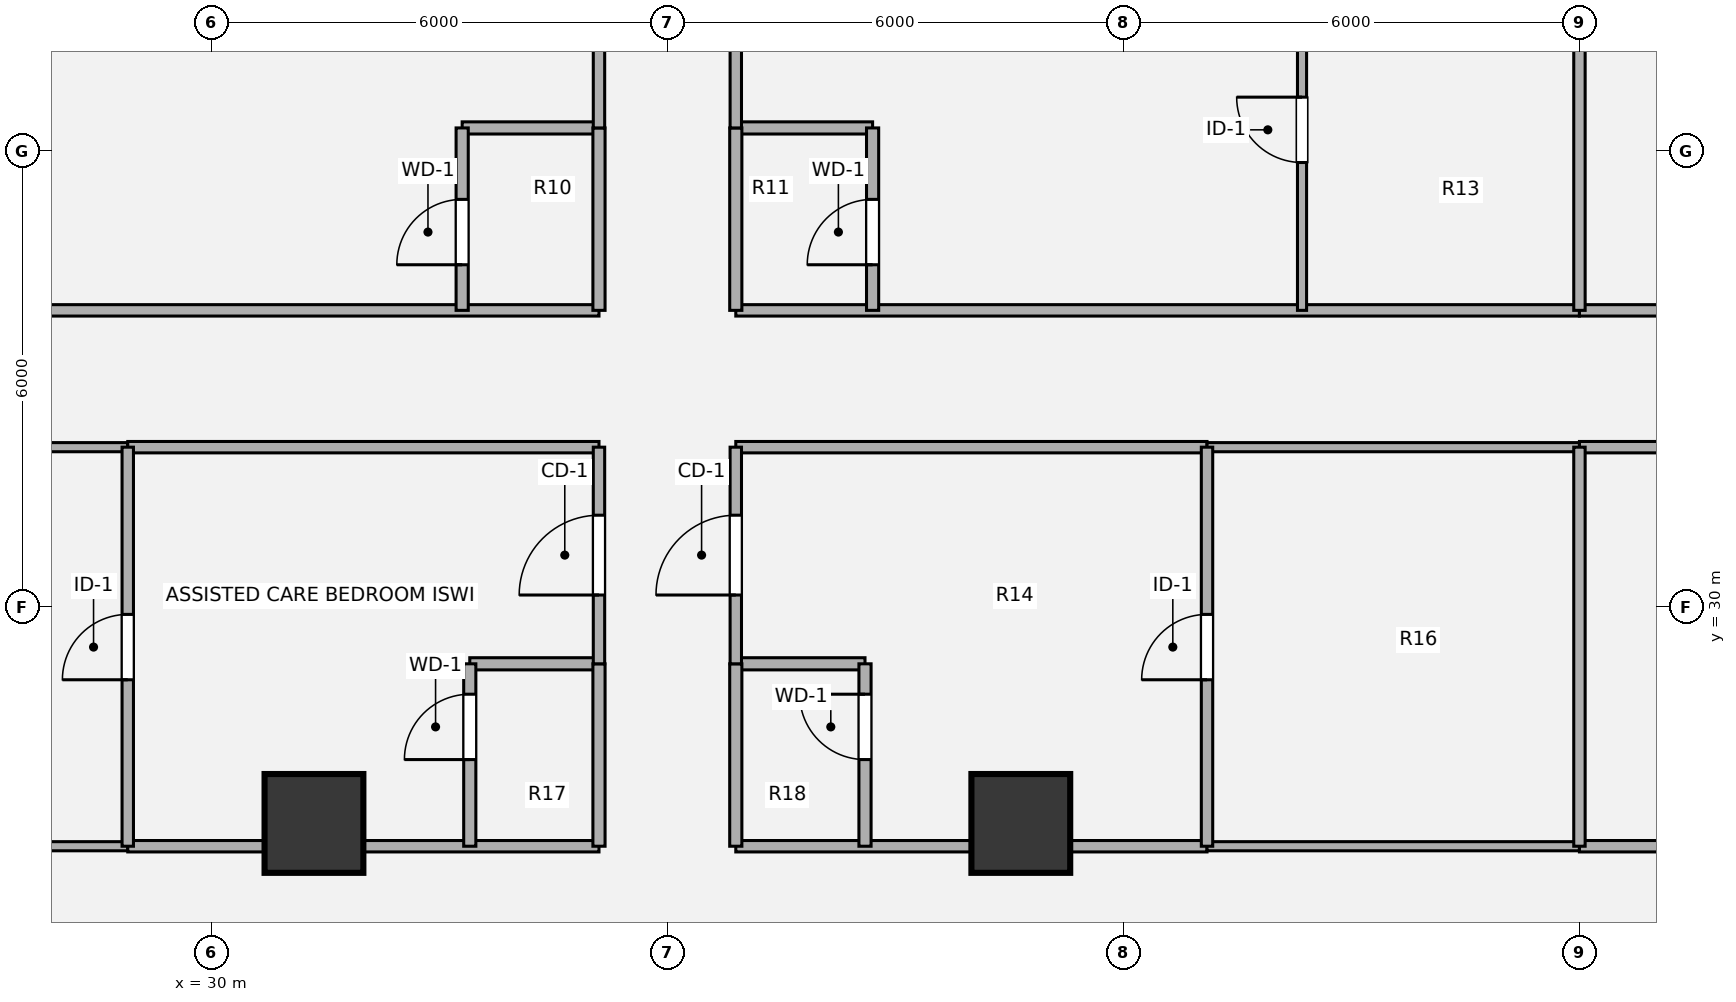
"""IFC4 building model, lengths in metres.
Left out: names, types, materials, properties, quantities, classifications, styles, units other than length and angle.
Written with IfcOpenShell. Run it as: python <this file> out.ifc"""

import sys

from ifc_helpers import new_model, si_unit, direction, frame, frame_2d, origin, origin_2d, place, context, subcontext, project, spatial, rectangle, hollow_circle, extrude, source, transform, mapped, element, fill, save


model = new_model("IFC4")
c1 = context("Model", 3, precision=1e-05, world=origin(), true_north=direction((0.0, 1.0)))
c2 = subcontext(c1, "Body", "Model", "MODEL_VIEW")
j1 = project(units=[si_unit("LENGTHUNIT", "METRE"), si_unit("PLANEANGLEUNIT", "RADIAN")], contexts=[c1])
p1 = place(None, origin())
s1 = spatial("IfcSite", under=j1, at=p1, CompositionType="ELEMENT")
p2 = place(p1, origin())
s2 = spatial("IfcBuilding", under=s1, at=p2, CompositionType="ELEMENT")
p3 = place(p2, frame((0.0, 0.0, 89.82)))
s3 = spatial("IfcBuildingStorey", under=s2, at=p3, CompositionType="ELEMENT", Elevation=89.82)
m1 = source(origin(), c2, "Body", "SweptSolid", [
    extrude(hollow_circle(Radius=0.65, WallThickness=0.045, at=origin_2d()), origin(), (0.0, 0.0, 1.0), 3.78),
])
for number, where, z_axis, x_axis in (
    (1, (31.35, 27.15, 0.0), (0.0, 0.0, 1.0), (1.0, 0.0, 0.0)),
    (2, (40.65, 27.15, 0.0), (0.0, 0.0, 1.0), (1.0, 0.0, 0.0)),
):
    element("IfcColumn", number, at=place(p3, frame(where, z_axis=z_axis, x_axis=x_axis)), inside=s3, PredefinedType="COLUMN", context=c2, shape_type="MappedRepresentation", body=[
        mapped(m1, transform((0.0, 0.0, 0.0), x_axis=(1.0, 0.0, 0.0), y_axis=(0.0, 1.0, 0.0), z_axis=(0.0, 0.0, 1.0), scale=1.0)),
    ])
p4 = place(p3, frame((24.0, 26.85, 0.0), z_axis=(0.0, 0.0, 1.0), x_axis=(1.0, 0.0, 0.0)))
e3 = element("IfcWall", 3, at=p4, inside=s3, PredefinedType="PARTITIONING", context=c2, shape_type="SweptSolid", body=[
    extrude(rectangle(XDim=4.9, YDim=0.12, at=frame_2d((2.45, 0.0))), origin(), (0.0, 0.0, 1.0), 3.055),
])
for number, where, z_axis, x_axis in (
    (4, (28.9, 26.85, 0.0), (0.0, 0.0, 1.0), (1.0, 0.0, 0.0)),
    (5, (36.9, 26.85, 0.0), (0.0, 0.0, 1.0), (1.0, 0.0, 0.0)),
):
    element("IfcWall", number, at=place(p3, frame(where, z_axis=z_axis, x_axis=x_axis)), inside=s3, PredefinedType="PARTITIONING", context=c2, shape_type="SweptSolid", body=[
        extrude(rectangle(XDim=6.2, YDim=0.15, at=frame_2d((3.1, 0.0))), origin(), (0.0, 0.0, 1.0), 2.903),
    ])
p5 = place(p3, frame((43.1, 26.85, 0.0), z_axis=(0.0, 0.0, 1.0), x_axis=(1.0, 0.0, 0.0)))
e6 = element("IfcWall", 6, at=p5, inside=s3, PredefinedType="PARTITIONING", context=c2, shape_type="SweptSolid", body=[
    extrude(rectangle(XDim=4.9, YDim=0.12, at=frame_2d((2.45, 0.0))), origin(), (0.0, 0.0, 1.0), 3.055),
])
p6 = place(p3, frame((48.0, 26.85, 0.0), z_axis=(0.0, 0.0, 1.0), x_axis=(1.0, 0.0, 0.0)))
e7 = element("IfcWall", 7, at=p6, inside=s3, PredefinedType="PARTITIONING", context=c2, shape_type="SweptSolid", body=[
    extrude(rectangle(XDim=9.949, YDim=0.15, at=frame_2d((4.974, 0.0))), origin(), (0.0, 0.0, 1.0), 3.055),
])
for number, where, z_axis, x_axis in (
    (8, (33.4, 29.25, 0.0), (0.0, 0.0, 1.0), (1.0, 0.0, 0.0)),
    (9, (36.9, 29.25, 0.0), (0.0, 0.0, 1.0), (1.0, 0.0, 0.0)),
):
    element("IfcWall", number, at=place(p3, frame(where, z_axis=z_axis, x_axis=x_axis)), inside=s3, PredefinedType="PLUMBINGWALL", context=c2, shape_type="SweptSolid", body=[
        extrude(rectangle(XDim=1.7, YDim=0.16, at=frame_2d((0.85, 0.0))), origin(), (0.0, 0.0, 1.0), 3.259),
    ])
p7 = place(p3, frame((24.0, 32.1, 0.0), z_axis=(0.0, 0.0, 1.0), x_axis=(1.0, 0.0, 0.0)))
e10 = element("IfcWall", 10, at=p7, inside=s3, PredefinedType="PARTITIONING", context=c2, shape_type="SweptSolid", body=[
    extrude(rectangle(XDim=4.9, YDim=0.12, at=frame_2d((2.45, 0.0))), origin(), (0.0, 0.0, 1.0), 2.982),
])
for number, where, z_axis, x_axis in (
    (11, (28.9, 32.1, 0.0), (0.0, 0.0, 1.0), (1.0, 0.0, 0.0)),
    (12, (36.9, 32.1, 0.0), (0.0, 0.0, 1.0), (1.0, 0.0, 0.0)),
):
    element("IfcWall", number, at=place(p3, frame(where, z_axis=z_axis, x_axis=x_axis)), inside=s3, PredefinedType="PARTITIONING", context=c2, shape_type="SweptSolid", body=[
        extrude(rectangle(XDim=6.2, YDim=0.15, at=frame_2d((3.1, 0.0))), origin(), (0.0, 0.0, 1.0), 2.982),
    ])
p8 = place(p3, frame((43.1, 32.1, 0.0), z_axis=(0.0, 0.0, 1.0), x_axis=(1.0, 0.0, 0.0)))
e13 = element("IfcWall", 13, at=p8, inside=s3, PredefinedType="PARTITIONING", context=c2, shape_type="SweptSolid", body=[
    extrude(rectangle(XDim=4.9, YDim=0.12, at=frame_2d((2.45, 0.0))), origin(), (0.0, 0.0, 1.0), 2.982),
])
p9 = place(p3, frame((48.0, 32.1, 0.0), z_axis=(0.0, 0.0, 1.0), x_axis=(1.0, 0.0, 0.0)))
e14 = element("IfcWall", 14, at=p9, inside=s3, PredefinedType="PARTITIONING", context=c2, shape_type="SweptSolid", body=[
    extrude(rectangle(XDim=10.02, YDim=0.15, at=frame_2d((5.01, 0.0))), origin(), (0.0, 0.0, 1.0), 2.982),
])
p10 = place(p9, frame((2.275, 0.0, 0.0)))
e15 = element("IfcOpeningElement", 15, at=p10, cuts=e14, PredefinedType="OPENING", context=c2, shape_type="SweptSolid", body=[
    extrude(rectangle(XDim=1.05, YDim=2.1, at=origin_2d()), frame((0.525, 0.085, 1.05), z_axis=(0.0, -1.0, 0.0), x_axis=(1.0, 0.0, 0.0)), (0.0, 0.0, 1.0), 0.17),
])
for number, where, z_axis, x_axis in (
    (16, (24.0, 33.9, 0.0), (0.0, 0.0, 1.0), (1.0, 0.0, 0.0)),
    (17, (36.9, 33.9, 0.0), (0.0, 0.0, 1.0), (1.0, 0.0, 0.0)),
):
    element("IfcWall", number, at=place(p3, frame(where, z_axis=z_axis, x_axis=x_axis)), inside=s3, PredefinedType="PARTITIONING", context=c2, shape_type="SweptSolid", body=[
        extrude(rectangle(XDim=11.1, YDim=0.15, at=frame_2d((5.55, 0.0))), origin(), (0.0, 0.0, 1.0), 2.982),
    ])
p11 = place(p3, frame((48.0, 33.9, 0.0), z_axis=(0.0, 0.0, 1.0), x_axis=(1.0, 0.0, 0.0)))
e18 = element("IfcWall", 18, at=p11, inside=s3, PredefinedType="PARTITIONING", context=c2, shape_type="SweptSolid", body=[
    extrude(rectangle(XDim=10.02, YDim=0.15, at=frame_2d((5.01, 0.0))), origin(), (0.0, 0.0, 1.0), 2.982),
])
p12 = place(p11, frame((2.275, 0.0, 0.0)))
e19 = element("IfcOpeningElement", 19, at=p12, cuts=e18, PredefinedType="OPENING", context=c2, shape_type="SweptSolid", body=[
    extrude(rectangle(XDim=1.05, YDim=2.1, at=origin_2d()), frame((0.525, 0.085, 1.05), z_axis=(0.0, -1.0, 0.0), x_axis=(1.0, 0.0, 0.0)), (0.0, 0.0, 1.0), 0.17),
])
for number, where, z_axis, x_axis in (
    (20, (33.3, 36.3, 0.0), (0.0, 0.0, 1.0), (1.0, 0.0, 0.0)),
    (21, (36.9, 36.3, 0.0), (0.0, 0.0, 1.0), (1.0, 0.0, 0.0)),
):
    element("IfcWall", number, at=place(p3, frame(where, z_axis=z_axis, x_axis=x_axis)), inside=s3, PredefinedType="PLUMBINGWALL", context=c2, shape_type="SweptSolid", body=[
        extrude(rectangle(XDim=1.8, YDim=0.16, at=frame_2d((0.9, 0.0))), origin(), (0.0, 0.0, 1.0), 3.259),
    ])
p13 = place(p3, frame((28.9, 26.85, 0.0), z_axis=(0.0, 0.0, 1.0), x_axis=(0.0, 1.0, 0.0)))
e22 = element("IfcWall", 22, at=p13, inside=s3, PredefinedType="PARTITIONING", context=c2, shape_type="SweptSolid", body=[
    extrude(rectangle(XDim=5.25, YDim=0.15, at=frame_2d((2.625, 0.0))), origin(), (0.0, 0.0, 1.0), 3.5),
])
p14 = place(p13, frame((2.19, 0.0, 0.0)))
e23 = element("IfcOpeningElement", 23, at=p14, cuts=e22, PredefinedType="OPENING", context=c2, shape_type="SweptSolid", body=[
    extrude(rectangle(XDim=0.86, YDim=2.1, at=origin_2d()), frame((0.43, 0.085, 1.05), z_axis=(0.0, -1.0, 0.0), x_axis=(1.0, 0.0, 0.0)), (0.0, 0.0, 1.0), 0.17),
])
p15 = place(p3, frame((33.3, 33.9, 0.0), z_axis=(0.0, 0.0, 1.0), x_axis=(0.0, 1.0, 0.0)))
e24 = element("IfcWall", 24, at=p15, inside=s3, PredefinedType="PLUMBINGWALL", context=c2, shape_type="SweptSolid", body=[
    extrude(rectangle(XDim=2.4, YDim=0.16, at=frame_2d((1.2, 0.0))), origin(), (0.0, 0.0, 1.0), 3.5),
])
p16 = place(p15, frame((0.6, 0.0, 0.0)))
e25 = element("IfcOpeningElement", 25, at=p16, cuts=e24, PredefinedType="OPENING", context=c2, shape_type="SweptSolid", body=[
    extrude(rectangle(XDim=0.86, YDim=2.1, at=origin_2d()), frame((0.43, 0.09, 1.05), z_axis=(0.0, -1.0, 0.0), x_axis=(1.0, 0.0, 0.0)), (0.0, 0.0, 1.0), 0.18),
])
p17 = place(p3, frame((33.4, 26.85, 0.0), z_axis=(0.0, 0.0, 1.0), x_axis=(0.0, 1.0, 0.0)))
e26 = element("IfcWall", 26, at=p17, inside=s3, PredefinedType="PLUMBINGWALL", context=c2, shape_type="SweptSolid", body=[
    extrude(rectangle(XDim=2.4, YDim=0.16, at=frame_2d((1.2, 0.0))), origin(), (0.0, 0.0, 1.0), 3.5),
])
p18 = place(p17, frame((1.14, 0.0, 0.0)))
e27 = element("IfcOpeningElement", 27, at=p18, cuts=e26, PredefinedType="OPENING", context=c2, shape_type="SweptSolid", body=[
    extrude(rectangle(XDim=0.86, YDim=2.1, at=origin_2d()), frame((0.43, 0.09, 1.05), z_axis=(0.0, -1.0, 0.0), x_axis=(1.0, 0.0, 0.0)), (0.0, 0.0, 1.0), 0.18),
])
p19 = place(p3, frame((35.1, 26.85, 0.0), z_axis=(0.0, 0.0, 1.0), x_axis=(0.0, 1.0, 0.0)))
e28 = element("IfcWall", 28, at=p19, inside=s3, PredefinedType="PLUMBINGWALL", context=c2, shape_type="SweptSolid", body=[
    extrude(rectangle(XDim=2.4, YDim=0.16, at=frame_2d((1.2, 0.0))), origin(), (0.0, 0.0, 1.0), 3.5),
])
p20 = place(p3, frame((35.1, 29.25, 0.0), z_axis=(0.0, 0.0, 1.0), x_axis=(0.0, 1.0, 0.0)))
e29 = element("IfcWall", 29, at=p20, inside=s3, PredefinedType="PARTITIONING", context=c2, shape_type="SweptSolid", body=[
    extrude(rectangle(XDim=2.85, YDim=0.15, at=frame_2d((1.425, 0.0))), origin(), (0.0, 0.0, 1.0), 3.5),
])
p21 = place(p20, frame((0.905, 0.0, 0.0)))
e30 = element("IfcOpeningElement", 30, at=p21, cuts=e29, PredefinedType="OPENING", context=c2, shape_type="SweptSolid", body=[
    extrude(rectangle(XDim=1.05, YDim=2.1, at=origin_2d()), frame((0.525, 0.085, 1.05), z_axis=(0.0, -1.0, 0.0), x_axis=(1.0, 0.0, 0.0)), (0.0, 0.0, 1.0), 0.17),
])
p22 = place(p3, frame((35.1, 33.9, 0.0), z_axis=(0.0, 0.0, 1.0), x_axis=(0.0, 1.0, 0.0)))
e31 = element("IfcWall", 31, at=p22, inside=s3, PredefinedType="PLUMBINGWALL", context=c2, shape_type="SweptSolid", body=[
    extrude(rectangle(XDim=2.4, YDim=0.16, at=frame_2d((1.2, 0.0))), origin(), (0.0, 0.0, 1.0), 3.5),
])
p23 = place(p3, frame((35.1, 36.3, 0.0), z_axis=(0.0, 0.0, 1.0), x_axis=(0.0, 1.0, 0.0)))
e32 = element("IfcWall", 32, at=p23, inside=s3, PredefinedType="PARTITIONING", context=c2, shape_type="SweptSolid", body=[
    extrude(rectangle(XDim=4.7, YDim=0.15, at=frame_2d((2.35, 0.0))), origin(), (0.0, 0.0, 1.0), 3.5),
])
p24 = place(p23, frame((1.89, 0.0, 0.0)))
e33 = element("IfcOpeningElement", 33, at=p24, cuts=e32, PredefinedType="OPENING", context=c2, shape_type="SweptSolid", body=[
    extrude(rectangle(XDim=0.92, YDim=2.1, at=origin_2d()), frame((0.46, 0.085, 1.05), z_axis=(0.0, -1.0, 0.0), x_axis=(1.0, 0.0, 0.0)), (0.0, 0.0, 1.0), 0.17),
])
p25 = place(p3, frame((36.9, 26.85, 0.0), z_axis=(0.0, 0.0, 1.0), x_axis=(0.0, 1.0, 0.0)))
e34 = element("IfcWall", 34, at=p25, inside=s3, PredefinedType="PLUMBINGWALL", context=c2, shape_type="SweptSolid", body=[
    extrude(rectangle(XDim=2.4, YDim=0.16, at=frame_2d((1.2, 0.0))), origin(), (0.0, 0.0, 1.0), 3.5),
])
p26 = place(p3, frame((36.9, 29.25, 0.0), z_axis=(0.0, 0.0, 1.0), x_axis=(0.0, 1.0, 0.0)))
e35 = element("IfcWall", 35, at=p26, inside=s3, PredefinedType="PARTITIONING", context=c2, shape_type="SweptSolid", body=[
    extrude(rectangle(XDim=2.85, YDim=0.15, at=frame_2d((1.425, 0.0))), origin(), (0.0, 0.0, 1.0), 3.5),
])
p27 = place(p26, frame((0.905, 0.0, 0.0)))
e36 = element("IfcOpeningElement", 36, at=p27, cuts=e35, PredefinedType="OPENING", context=c2, shape_type="SweptSolid", body=[
    extrude(rectangle(XDim=1.05, YDim=2.1, at=origin_2d()), frame((0.525, 0.085, 1.05), z_axis=(0.0, -1.0, 0.0), x_axis=(1.0, 0.0, 0.0)), (0.0, 0.0, 1.0), 0.17),
])
p28 = place(p3, frame((36.9, 33.9, 0.0), z_axis=(0.0, 0.0, 1.0), x_axis=(0.0, 1.0, 0.0)))
e37 = element("IfcWall", 37, at=p28, inside=s3, PredefinedType="PLUMBINGWALL", context=c2, shape_type="SweptSolid", body=[
    extrude(rectangle(XDim=2.4, YDim=0.16, at=frame_2d((1.2, 0.0))), origin(), (0.0, 0.0, 1.0), 3.5),
])
p29 = place(p3, frame((36.9, 36.3, 0.0), z_axis=(0.0, 0.0, 1.0), x_axis=(0.0, 1.0, 0.0)))
e38 = element("IfcWall", 38, at=p29, inside=s3, PredefinedType="PARTITIONING", context=c2, shape_type="SweptSolid", body=[
    extrude(rectangle(XDim=4.7, YDim=0.15, at=frame_2d((2.35, 0.0))), origin(), (0.0, 0.0, 1.0), 3.5),
])
p30 = place(p29, frame((1.89, 0.0, 0.0)))
e39 = element("IfcOpeningElement", 39, at=p30, cuts=e38, PredefinedType="OPENING", context=c2, shape_type="SweptSolid", body=[
    extrude(rectangle(XDim=0.92, YDim=2.1, at=origin_2d()), frame((0.46, 0.085, 1.05), z_axis=(0.0, -1.0, 0.0), x_axis=(1.0, 0.0, 0.0)), (0.0, 0.0, 1.0), 0.17),
])
p31 = place(p3, frame((38.6, 26.85, 0.0), z_axis=(0.0, 0.0, 1.0), x_axis=(0.0, 1.0, 0.0)))
e40 = element("IfcWall", 40, at=p31, inside=s3, PredefinedType="PLUMBINGWALL", context=c2, shape_type="SweptSolid", body=[
    extrude(rectangle(XDim=2.4, YDim=0.16, at=frame_2d((1.2, 0.0))), origin(), (0.0, 0.0, 1.0), 3.5),
])
p32 = place(p31, frame((1.14, 0.0, 0.0)))
e41 = element("IfcOpeningElement", 41, at=p32, cuts=e40, PredefinedType="OPENING", context=c2, shape_type="SweptSolid", body=[
    extrude(rectangle(XDim=0.86, YDim=2.1, at=origin_2d()), frame((0.43, 0.09, 1.05), z_axis=(0.0, -1.0, 0.0), x_axis=(1.0, 0.0, 0.0)), (0.0, 0.0, 1.0), 0.18),
])
p33 = place(p3, frame((38.7, 33.9, 0.0), z_axis=(0.0, 0.0, 1.0), x_axis=(0.0, 1.0, 0.0)))
e42 = element("IfcWall", 42, at=p33, inside=s3, PredefinedType="PLUMBINGWALL", context=c2, shape_type="SweptSolid", body=[
    extrude(rectangle(XDim=2.4, YDim=0.16, at=frame_2d((1.2, 0.0))), origin(), (0.0, 0.0, 1.0), 3.5),
])
p34 = place(p33, frame((0.6, 0.0, 0.0)))
e43 = element("IfcOpeningElement", 43, at=p34, cuts=e42, PredefinedType="OPENING", context=c2, shape_type="SweptSolid", body=[
    extrude(rectangle(XDim=0.86, YDim=2.1, at=origin_2d()), frame((0.43, 0.09, 1.05), z_axis=(0.0, -1.0, 0.0), x_axis=(1.0, 0.0, 0.0)), (0.0, 0.0, 1.0), 0.18),
])
p35 = place(p3, frame((43.1, 26.85, 0.0), z_axis=(0.0, 0.0, 1.0), x_axis=(0.0, 1.0, 0.0)))
e44 = element("IfcWall", 44, at=p35, inside=s3, PredefinedType="PARTITIONING", context=c2, shape_type="SweptSolid", body=[
    extrude(rectangle(XDim=5.25, YDim=0.15, at=frame_2d((2.625, 0.0))), origin(), (0.0, 0.0, 1.0), 3.5),
])
p36 = place(p35, frame((2.19, 0.0, 0.0)))
e45 = element("IfcOpeningElement", 45, at=p36, cuts=e44, PredefinedType="OPENING", context=c2, shape_type="SweptSolid", body=[
    extrude(rectangle(XDim=0.86, YDim=2.1, at=origin_2d()), frame((0.43, 0.085, 1.05), z_axis=(0.0, -1.0, 0.0), x_axis=(1.0, 0.0, 0.0)), (0.0, 0.0, 1.0), 0.17),
])
p37 = place(p3, frame((44.35, 33.9, 0.0), z_axis=(0.0, 0.0, 1.0), x_axis=(0.0, 1.0, 0.0)))
e46 = element("IfcWall", 46, at=p37, inside=s3, PredefinedType="PARTITIONING", context=c2, shape_type="SweptSolid", body=[
    extrude(rectangle(XDim=4.75, YDim=0.12, at=frame_2d((2.375, 0.0))), origin(), (0.0, 0.0, 1.0), 3.5),
])
p38 = place(p37, frame((1.945, 0.0, 0.0)))
e47 = element("IfcOpeningElement", 47, at=p38, cuts=e46, PredefinedType="OPENING", context=c2, shape_type="SweptSolid", body=[
    extrude(rectangle(XDim=0.86, YDim=2.1, at=origin_2d()), frame((0.43, 0.07, 1.05), z_axis=(0.0, -1.0, 0.0), x_axis=(1.0, 0.0, 0.0)), (0.0, 0.0, 1.0), 0.14),
])
p39 = place(p3, frame((48.0, 26.85, 0.0), z_axis=(0.0, 0.0, 1.0), x_axis=(0.0, 1.0, 0.0)))
e48 = element("IfcWall", 48, at=p39, inside=s3, PredefinedType="PARTITIONING", context=c2, shape_type="SweptSolid", body=[
    extrude(rectangle(XDim=5.25, YDim=0.15, at=frame_2d((2.625, 0.0))), origin(), (0.0, 0.0, 1.0), 3.5),
])
p40 = place(p3, frame((48.0, 33.9, 0.0), z_axis=(0.0, 0.0, 1.0), x_axis=(0.0, 1.0, 0.0)))
e49 = element("IfcWall", 49, at=p40, inside=s3, PredefinedType="PARTITIONING", context=c2, shape_type="SweptSolid", body=[
    extrude(rectangle(XDim=13.421, YDim=0.15, at=frame_2d((6.71, 0.0))), origin(), (0.0, 0.0, 1.0), 3.5),
])
m2 = source(origin(), c2, "Body", "SweptSolid", [
    extrude(rectangle(XDim=0.86, YDim=2.1, at=origin_2d()), frame((0.43, 0.025, 1.05), z_axis=(0.0, -1.0, 0.0), x_axis=(1.0, 0.0, 0.0)), (0.0, 0.0, 1.0), 0.05),
])
p41 = place(p14, origin())
e50 = element("IfcDoor", 50, at=p41, inside=s3, OperationType="SINGLE_SWING_LEFT", PredefinedType="DOOR", context=c2, shape_type="MappedRepresentation", body=[
    mapped(m2, transform((0.0, 0.0, 0.0), x_axis=(1.0, 0.0, 0.0), y_axis=(0.0, 1.0, 0.0), z_axis=(0.0, 0.0, 1.0), scale=1.0)),
])
fill(e23, e50)
m3 = source(origin(), c2, "Body", "SweptSolid", [
    extrude(rectangle(XDim=0.86, YDim=2.1, at=origin_2d()), frame((0.43, 0.025, 1.05), z_axis=(0.0, -1.0, 0.0), x_axis=(1.0, 0.0, 0.0)), (0.0, 0.0, 1.0), 0.05),
])
p42 = place(p16, origin())
e51 = element("IfcDoor", 51, at=p42, inside=s3, OperationType="SINGLE_SWING_LEFT", PredefinedType="DOOR", context=c2, shape_type="MappedRepresentation", body=[
    mapped(m3, transform((0.0, 0.0, 0.0), x_axis=(1.0, 0.0, 0.0), y_axis=(0.0, 1.0, 0.0), z_axis=(0.0, 0.0, 1.0), scale=1.0)),
])
fill(e25, e51)
p43 = place(p18, origin())
e52 = element("IfcDoor", 52, at=p43, inside=s3, OperationType="SINGLE_SWING_LEFT", PredefinedType="DOOR", context=c2, shape_type="MappedRepresentation", body=[
    mapped(m3, transform((0.0, 0.0, 0.0), x_axis=(1.0, 0.0, 0.0), y_axis=(0.0, 1.0, 0.0), z_axis=(0.0, 0.0, 1.0), scale=1.0)),
])
fill(e27, e52)
m4 = source(origin(), c2, "Body", "SweptSolid", [
    extrude(rectangle(XDim=1.05, YDim=2.1, at=origin_2d()), frame((0.525, 0.025, 1.05), z_axis=(0.0, -1.0, 0.0), x_axis=(1.0, 0.0, 0.0)), (0.0, 0.0, 1.0), 0.05),
])
p44 = place(p21, origin())
e53 = element("IfcDoor", 53, at=p44, inside=s3, OperationType="SINGLE_SWING_LEFT", PredefinedType="DOOR", context=c2, shape_type="MappedRepresentation", body=[
    mapped(m4, transform((0.0, 0.0, 0.0), x_axis=(1.0, 0.0, 0.0), y_axis=(0.0, 1.0, 0.0), z_axis=(0.0, 0.0, 1.0), scale=1.0)),
])
fill(e30, e53)
p45 = place(p27, origin())
e54 = element("IfcDoor", 54, at=p45, inside=s3, OperationType="SINGLE_SWING_LEFT", PredefinedType="DOOR", context=c2, shape_type="MappedRepresentation", body=[
    mapped(m4, transform((0.0, 0.0, 0.0), x_axis=(1.0, 0.0, 0.0), y_axis=(0.0, 1.0, 0.0), z_axis=(0.0, 0.0, 1.0), scale=1.0)),
])
fill(e36, e54)
p46 = place(p32, origin())
e55 = element("IfcDoor", 55, at=p46, inside=s3, OperationType="SINGLE_SWING_RIGHT", PredefinedType="DOOR", context=c2, shape_type="MappedRepresentation", body=[
    mapped(m3, transform((0.0, 0.0, 0.0), x_axis=(1.0, 0.0, 0.0), y_axis=(0.0, 1.0, 0.0), z_axis=(0.0, 0.0, 1.0), scale=1.0)),
])
fill(e41, e55)
p47 = place(p34, origin())
e56 = element("IfcDoor", 56, at=p47, inside=s3, OperationType="SINGLE_SWING_LEFT", PredefinedType="DOOR", context=c2, shape_type="MappedRepresentation", body=[
    mapped(m3, transform((0.0, 0.0, 0.0), x_axis=(1.0, 0.0, 0.0), y_axis=(0.0, 1.0, 0.0), z_axis=(0.0, 0.0, 1.0), scale=1.0)),
])
fill(e43, e56)
p48 = place(p36, origin())
e57 = element("IfcDoor", 57, at=p48, inside=s3, OperationType="SINGLE_SWING_LEFT", PredefinedType="DOOR", context=c2, shape_type="MappedRepresentation", body=[
    mapped(m2, transform((0.0, 0.0, 0.0), x_axis=(1.0, 0.0, 0.0), y_axis=(0.0, 1.0, 0.0), z_axis=(0.0, 0.0, 1.0), scale=1.0)),
])
fill(e45, e57)
p49 = place(p38, origin())
e58 = element("IfcDoor", 58, at=p49, inside=s3, OperationType="SINGLE_SWING_RIGHT", PredefinedType="DOOR", context=c2, shape_type="MappedRepresentation", body=[
    mapped(m2, transform((0.0, 0.0, 0.0), x_axis=(1.0, 0.0, 0.0), y_axis=(0.0, 1.0, 0.0), z_axis=(0.0, 0.0, 1.0), scale=1.0)),
])
fill(e47, e58)
save(model, sys.argv[1])
